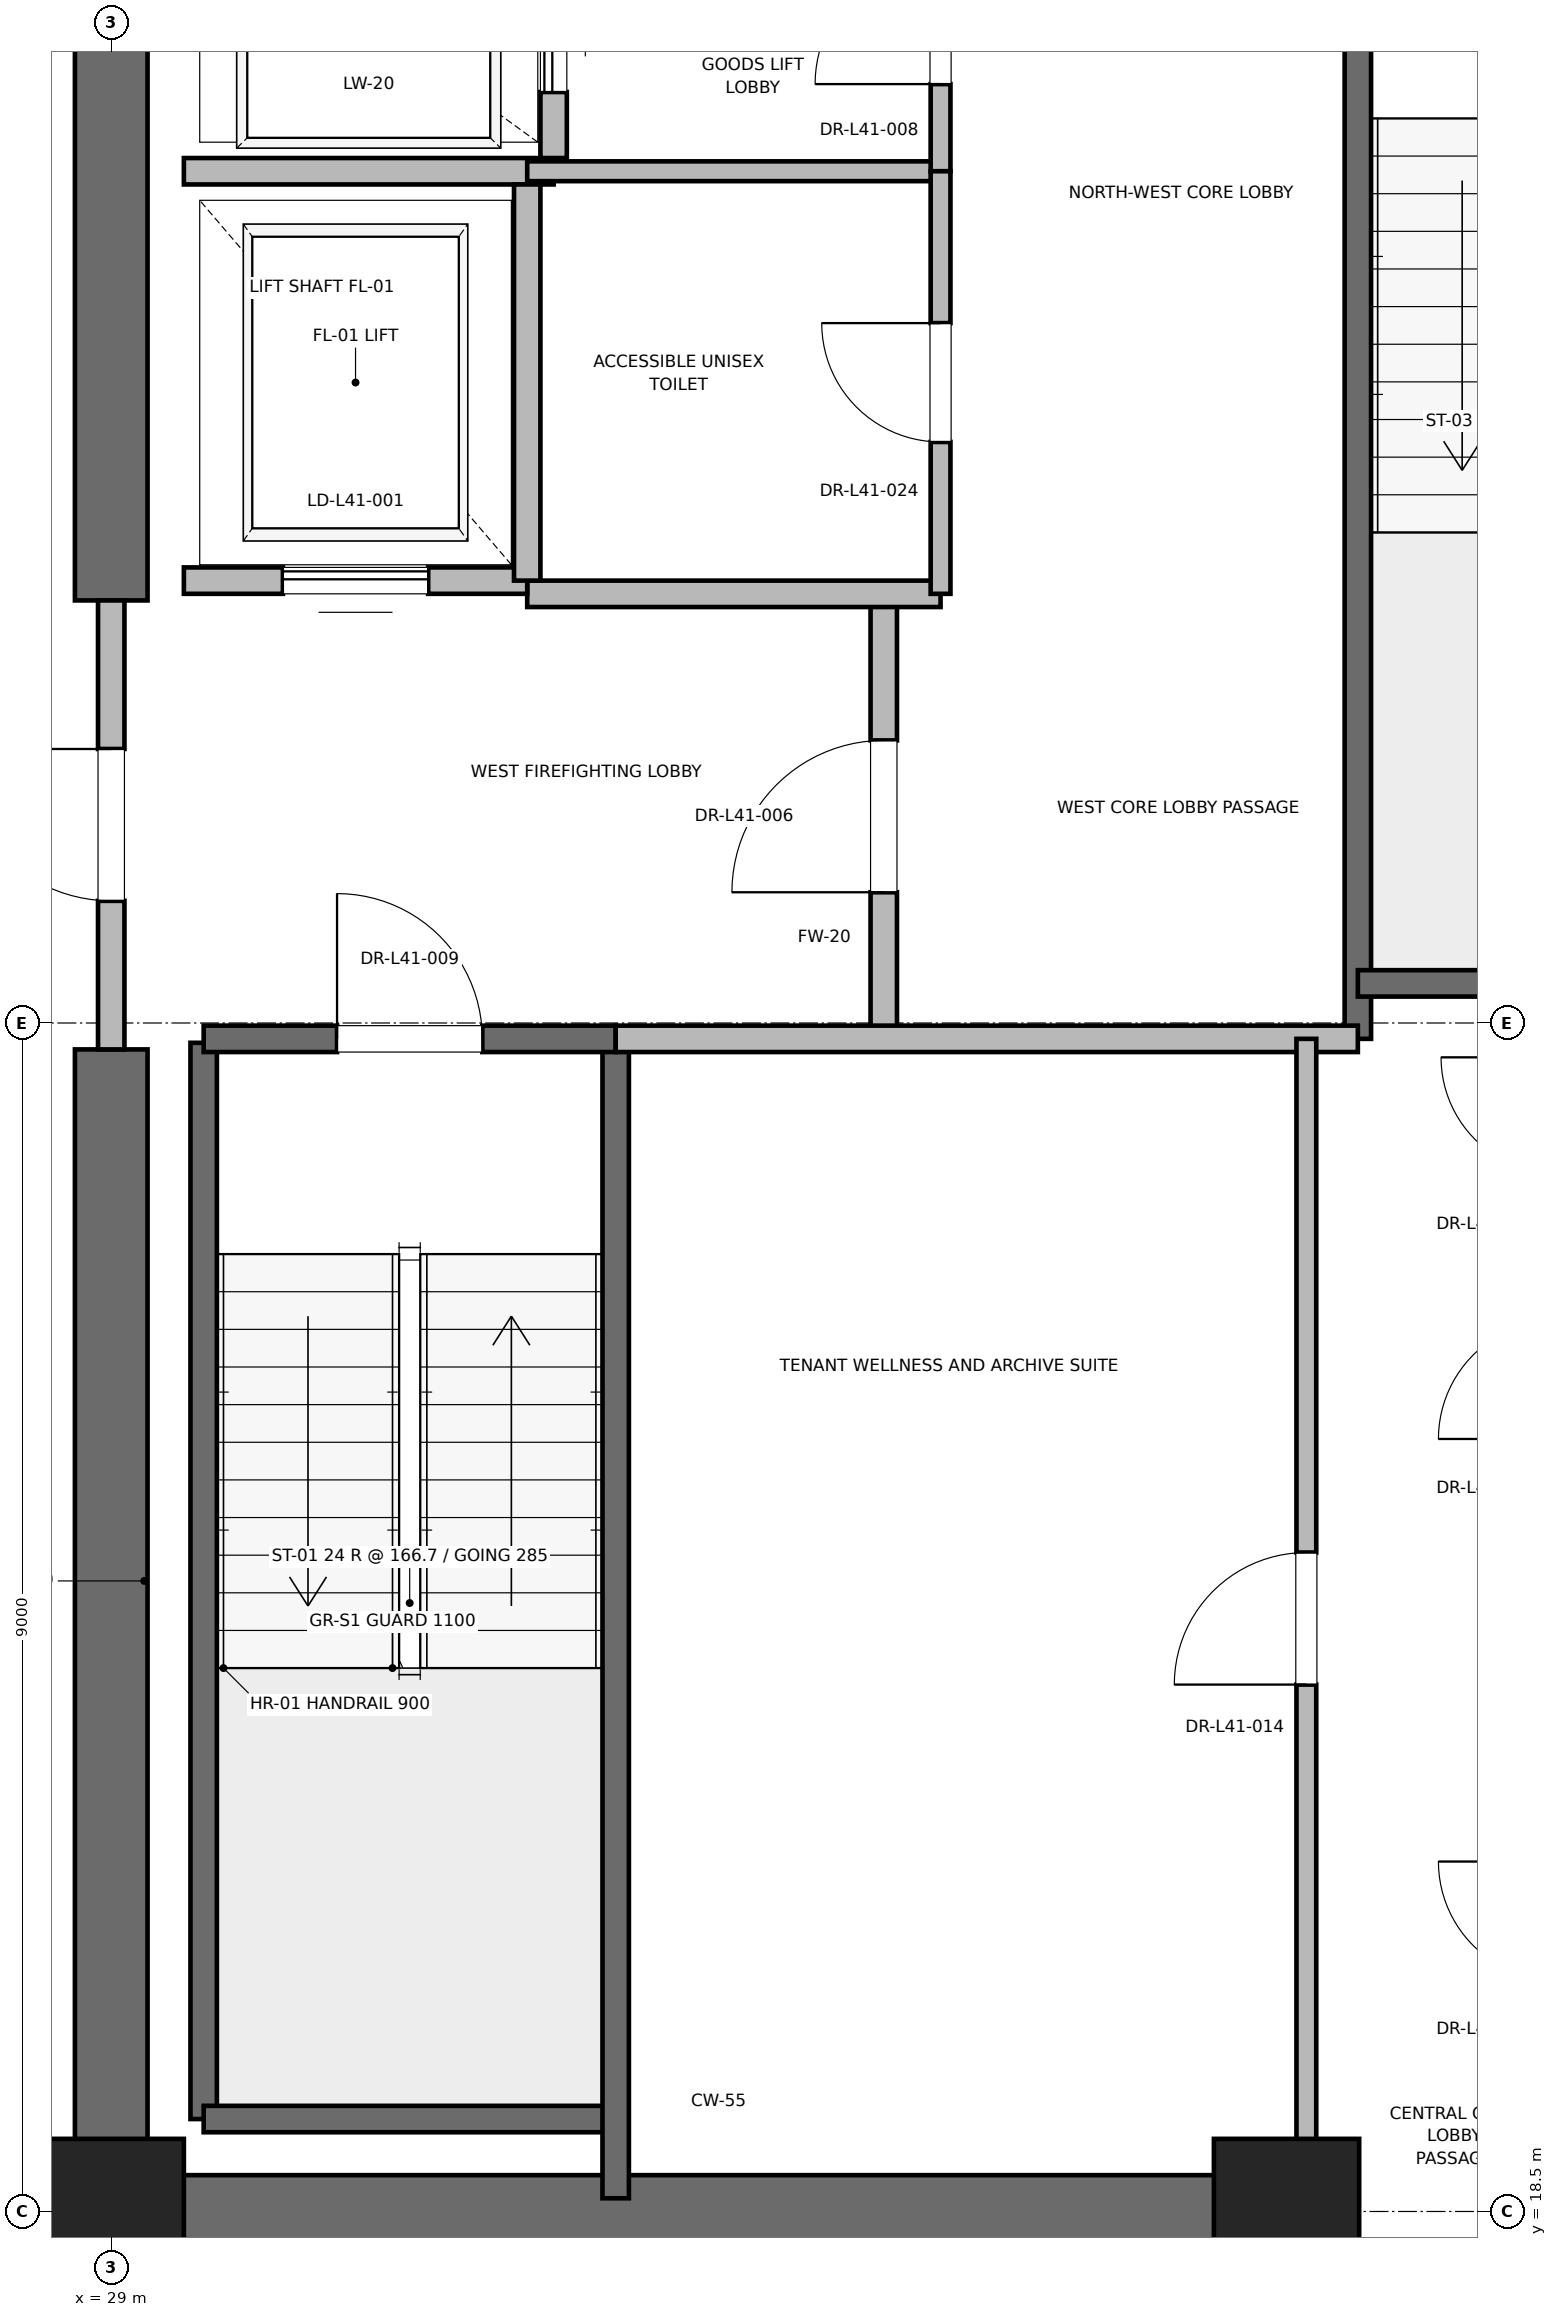
"""IFC4 building model, lengths in metres.
Left out: names, types, materials, properties, quantities, classifications, styles, units other than length and angle.
Written with IfcOpenShell. Run it as: python <this file> out.ifc"""

import sys

from ifc_helpers import new_model, si_unit, direction, frame, frame_2d, origin, origin_2d, place, context, subcontext, project, spatial, rectangle, extrude, element, fill, save


model = new_model("IFC4")
c1 = context("Model", 3, precision=1e-05, world=origin(), true_north=direction((0.0, 1.0)))
c2 = subcontext(c1, "Body", "Model", "MODEL_VIEW")
j1 = project(units=[si_unit("LENGTHUNIT", "METRE"), si_unit("PLANEANGLEUNIT", "RADIAN")], contexts=[c1])
p1 = place(None, origin())
s1 = spatial("IfcSite", under=j1, at=p1, CompositionType="ELEMENT")
p2 = place(p1, origin())
s2 = spatial("IfcBuilding", under=s1, at=p2, CompositionType="ELEMENT")
p3 = place(p2, frame((0.0, 0.0, 176.4)))
s3 = spatial("IfcBuildingStorey", under=s2, at=p3, CompositionType="ELEMENT", Elevation=176.4)
for number, where, z_axis, x_axis in (
    (1, (29.0, 18.5, 0.0), (0.0, 0.0, 1.0), (1.0, 0.0, 0.0)),
    (2, (37.9, 18.5, 0.0), (0.0, 0.0, 1.0), (1.0, 0.0, 0.0)),
):
    element("IfcColumn", number, at=place(p3, frame(where, z_axis=z_axis, x_axis=x_axis)), inside=s3, PredefinedType="PILASTER", context=c2, shape_type="SweptSolid", body=[
        extrude(rectangle(XDim=1.1, YDim=1.1, at=origin_2d()), origin(), (0.0, 0.0, 1.0), 4.0),
    ])
p4 = place(p3, frame((29.0, 18.5, 0.0), z_axis=(0.0, 0.0, 1.0), x_axis=(1.0, 0.0, 0.0)))
e3 = element("IfcWall", 3, at=p4, inside=s3, PredefinedType="SHEAR", context=c2, shape_type="SweptSolid", body=[
    extrude(rectangle(XDim=9.2, YDim=0.55, at=frame_2d((4.6, 0.0))), origin(), (0.0, 0.0, 1.0), 3.775),
])
p5 = place(p3, frame((29.0, 18.5, 0.0), z_axis=(0.0, 0.0, 1.0), x_axis=(0.0, 1.0, 0.0)))
e4 = element("IfcWall", 4, at=p5, inside=s3, PredefinedType="SHEAR", context=c2, shape_type="SweptSolid", body=[
    extrude(rectangle(XDim=8.8, YDim=0.55, at=frame_2d((4.4, 0.0))), origin(), (0.0, 0.0, 1.0), 3.775),
])
p6 = place(p3, frame((29.0, 30.7, 0.0), z_axis=(0.0, 0.0, 1.0), x_axis=(0.0, 1.0, 0.0)))
e5 = element("IfcWall", 5, at=p6, inside=s3, PredefinedType="SHEAR", context=c2, shape_type="SweptSolid", body=[
    extrude(rectangle(XDim=5.8, YDim=0.55, at=frame_2d((2.9, 0.0))), origin(), (0.0, 0.0, 1.0), 3.775),
])
p7 = place(p3, frame((29.7, 19.2, 0.0), z_axis=(0.0, 0.0, 1.0), x_axis=(0.0, 1.0, 0.0)))
e6 = element("IfcWall", 6, at=p7, inside=s3, PredefinedType="SOLIDWALL", context=c2, shape_type="SweptSolid", body=[
    extrude(rectangle(XDim=8.15, YDim=0.2, at=frame_2d((4.075, 0.0))), origin(), (0.0, 0.0, 1.0), 3.775),
])
p8 = place(p3, frame((29.7, 19.2, 0.0), z_axis=(0.0, 0.0, 1.0), x_axis=(1.0, 0.0, 0.0)))
e7 = element("IfcWall", 7, at=p8, inside=s3, PredefinedType="SOLIDWALL", context=c2, shape_type="SweptSolid", body=[
    extrude(rectangle(XDim=3.12, YDim=0.2, at=frame_2d((1.56, 0.0))), origin(), (0.0, 0.0, 1.0), 3.775),
])
p9 = place(p3, frame((32.82, 18.6, 0.0), z_axis=(0.0, 0.0, 1.0), x_axis=(0.0, 1.0, 0.0)))
e8 = element("IfcWall", 8, at=p9, inside=s3, PredefinedType="SOLIDWALL", context=c2, shape_type="SweptSolid", body=[
    extrude(rectangle(XDim=8.78, YDim=0.2, at=frame_2d((4.39, 0.0))), origin(), (0.0, 0.0, 1.0), 3.775),
])
p10 = place(p3, frame((29.7, 27.38, 0.0), z_axis=(0.0, 0.0, 1.0), x_axis=(1.0, 0.0, 0.0)))
e9 = element("IfcWall", 9, at=p10, inside=s3, PredefinedType="SOLIDWALL", context=c2, shape_type="SweptSolid", body=[
    extrude(rectangle(XDim=3.12, YDim=0.2, at=frame_2d((1.56, 0.0))), origin(), (0.0, 0.0, 1.0), 3.775),
])
p11 = place(p10, frame((1.01, 0.0, 0.0)))
e10 = element("IfcOpeningElement", 10, at=p11, cuts=e9, PredefinedType="OPENING", context=c2, shape_type="SweptSolid", body=[
    extrude(rectangle(XDim=1.1, YDim=2.15, at=frame_2d((0.55, 1.075))), frame((0.0, 0.1, 0.0), z_axis=(0.0, -1.0, 0.0), x_axis=(1.0, 0.0, 0.0)), (0.0, 0.0, 1.0), 0.2),
])
p12 = place(p3, frame((38.44, 27.38, 0.0), z_axis=(0.0, 0.0, 1.0), x_axis=(0.0, 1.0, 0.0)))
e11 = element("IfcWall", 11, at=p12, inside=s3, PredefinedType="SOLIDWALL", context=c2, shape_type="SweptSolid", body=[
    extrude(rectangle(XDim=8.87, YDim=0.2, at=frame_2d((4.435, 0.0))), origin(), (0.0, 0.0, 1.0), 3.775),
])
p13 = place(p3, frame((38.44, 27.8, 0.0), z_axis=(0.0, 0.0, 1.0), x_axis=(1.0, 0.0, 0.0)))
e12 = element("IfcWall", 12, at=p13, inside=s3, PredefinedType="SOLIDWALL", context=c2, shape_type="SweptSolid", body=[
    extrude(rectangle(XDim=3.32, YDim=0.2, at=frame_2d((1.66, 0.0))), origin(), (0.0, 0.0, 1.0), 3.775),
])
p14 = place(p3, frame((34.85, 27.38, 0.0), z_axis=(0.0, 0.0, 1.0), x_axis=(0.0, 1.0, 0.0)))
e13 = element("IfcWall", 13, at=p14, inside=s3, PredefinedType="PARTITIONING", context=c2, shape_type="SweptSolid", body=[
    extrude(rectangle(XDim=3.37, YDim=0.2, at=frame_2d((1.685, 0.0))), origin(), (0.0, 0.0, 1.0), 3.775),
])
p15 = place(p14, frame((1.11, 0.0, 0.0)))
e14 = element("IfcOpeningElement", 14, at=p15, cuts=e13, PredefinedType="OPENING", context=c2, shape_type="SweptSolid", body=[
    extrude(rectangle(XDim=1.15, YDim=2.2, at=frame_2d((0.575, 1.1))), frame((0.0, 0.1, 0.0), z_axis=(0.0, -1.0, 0.0), x_axis=(1.0, 0.0, 0.0)), (0.0, 0.0, 1.0), 0.2),
])
p16 = place(p3, frame((29.0, 27.3, 0.0), z_axis=(0.0, 0.0, 1.0), x_axis=(0.0, 1.0, 0.0)))
e15 = element("IfcWall", 15, at=p16, inside=s3, PredefinedType="PARTITIONING", context=c2, shape_type="SweptSolid", body=[
    extrude(rectangle(XDim=3.4, YDim=0.2, at=frame_2d((1.7, 0.0))), origin(), (0.0, 0.0, 1.0), 2.755),
])
p17 = place(p16, frame((1.125, 0.0, 0.0)))
e16 = element("IfcOpeningElement", 16, at=p17, cuts=e15, PredefinedType="OPENING", context=c2, shape_type="SweptSolid", body=[
    extrude(rectangle(XDim=1.15, YDim=2.2, at=frame_2d((0.575, 1.1))), frame((0.0, 0.1, 0.0), z_axis=(0.0, -1.0, 0.0), x_axis=(1.0, 0.0, 0.0)), (0.0, 0.0, 1.0), 0.2),
])
p18 = place(p3, frame((32.82, 27.38, 0.0), z_axis=(0.0, 0.0, 1.0), x_axis=(1.0, 0.0, 0.0)))
e17 = element("IfcWall", 17, at=p18, inside=s3, PredefinedType="PARTITIONING", context=c2, shape_type="SweptSolid", body=[
    extrude(rectangle(XDim=5.62, YDim=0.2, at=frame_2d((2.81, 0.0))), origin(), (0.0, 0.0, 1.0), 3.775),
])
p19 = place(p3, frame((32.15, 30.75, 0.0), z_axis=(0.0, 0.0, 1.0), x_axis=(1.0, 0.0, 0.0)))
e18 = element("IfcWall", 18, at=p19, inside=s3, PredefinedType="PARTITIONING", context=c2, shape_type="SweptSolid", body=[
    extrude(rectangle(XDim=3.13, YDim=0.2, at=frame_2d((1.565, 0.0))), origin(), (0.0, 0.0, 1.0), 3.775),
])
p20 = place(p3, frame((29.55, 30.85, 0.0), z_axis=(0.0, 0.0, 1.0), x_axis=(1.0, 0.0, 0.0)))
e19 = element("IfcWall", 19, at=p20, inside=s3, PredefinedType="SOLIDWALL", context=c2, shape_type="SweptSolid", body=[
    extrude(rectangle(XDim=2.6, YDim=0.2, at=frame_2d((1.3, 0.0))), origin(), (0.0, 0.0, 1.0), 2.755),
])
p21 = place(p20, frame((0.75, 0.0, 0.0)))
e20 = element("IfcOpeningElement", 20, at=p21, cuts=e19, PredefinedType="OPENING", context=c2, shape_type="SweptSolid", body=[
    extrude(rectangle(XDim=1.1, YDim=2.2, at=frame_2d((0.55, 1.1))), frame((0.0, 0.1, 0.0), z_axis=(0.0, -1.0, 0.0), x_axis=(1.0, 0.0, 0.0)), (0.0, 0.0, 1.0), 0.2),
])
p22 = place(p3, frame((29.55, 33.95, 0.0), z_axis=(0.0, 0.0, 1.0), x_axis=(1.0, 0.0, 0.0)))
e21 = element("IfcWall", 21, at=p22, inside=s3, PredefinedType="SOLIDWALL", context=c2, shape_type="SweptSolid", body=[
    extrude(rectangle(XDim=2.8, YDim=0.2, at=frame_2d((1.4, 0.0))), origin(), (0.0, 0.0, 1.0), 3.775),
])
p23 = place(p3, frame((32.15, 30.85, 0.0), z_axis=(0.0, 0.0, 1.0), x_axis=(0.0, 1.0, 0.0)))
e22 = element("IfcWall", 22, at=p23, inside=s3, PredefinedType="SOLIDWALL", context=c2, shape_type="SweptSolid", body=[
    extrude(rectangle(XDim=3.0, YDim=0.2, at=frame_2d((1.5, 0.0))), origin(), (0.0, 0.0, 1.0), 3.775),
])
p24 = place(p3, frame((32.35, 34.05, 0.0), z_axis=(0.0, 0.0, 1.0), x_axis=(0.0, 1.0, 0.0)))
e23 = element("IfcWall", 23, at=p24, inside=s3, PredefinedType="SOLIDWALL", context=c2, shape_type="SweptSolid", body=[
    extrude(rectangle(XDim=2.1, YDim=0.2, at=frame_2d((1.05, 0.0))), origin(), (0.0, 0.0, 1.0), 3.775),
])
p25 = place(p24, frame((0.5, 0.0, 0.0)))
e24 = element("IfcOpeningElement", 24, at=p25, cuts=e23, PredefinedType="OPENING", context=c2, shape_type="SweptSolid", body=[
    extrude(rectangle(XDim=1.1, YDim=2.2, at=frame_2d((0.55, 1.1))), frame((0.0, 0.1, 0.0), z_axis=(0.0, -1.0, 0.0), x_axis=(1.0, 0.0, 0.0)), (0.0, 0.0, 1.0), 0.2),
])
p26 = place(p3, frame((32.15, 33.95, 0.0), z_axis=(0.0, 0.0, 1.0), x_axis=(1.0, 0.0, 0.0)))
e25 = element("IfcWall", 25, at=p26, inside=s3, PredefinedType="PARTITIONING", context=c2, shape_type="SweptSolid", body=[
    extrude(rectangle(XDim=3.13, YDim=0.15, at=frame_2d((1.565, 0.0))), origin(), (0.0, 0.0, 1.0), 2.85),
])
p27 = place(p3, frame((35.28, 33.95, 0.0), z_axis=(0.0, 0.0, 1.0), x_axis=(0.0, 1.0, 0.0)))
e26 = element("IfcWall", 26, at=p27, inside=s3, PredefinedType="PARTITIONING", context=c2, shape_type="SweptSolid", body=[
    extrude(rectangle(XDim=2.27, YDim=0.15, at=frame_2d((1.135, 0.0))), origin(), (0.0, 0.0, 1.0), 2.755),
])
p28 = place(p27, frame((0.66, 0.0, 0.0)))
e27 = element("IfcOpeningElement", 27, at=p28, cuts=e26, PredefinedType="OPENING", context=c2, shape_type="SweptSolid", body=[
    extrude(rectangle(XDim=0.95, YDim=2.15, at=frame_2d((0.475, 1.075))), frame((0.0, 0.075, 0.0), z_axis=(0.0, -1.0, 0.0), x_axis=(1.0, 0.0, 0.0)), (0.0, 0.0, 1.0), 0.15),
])
p29 = place(p3, frame((35.28, 30.75, 0.0), z_axis=(0.0, 0.0, 1.0), x_axis=(0.0, 1.0, 0.0)))
e28 = element("IfcWall", 28, at=p29, inside=s3, PredefinedType="PARTITIONING", context=c2, shape_type="SweptSolid", body=[
    extrude(rectangle(XDim=3.2, YDim=0.15, at=frame_2d((1.6, 0.0))), origin(), (0.0, 0.0, 1.0), 2.85),
])
p30 = place(p29, frame((1.15, 0.0, 0.0)))
e29 = element("IfcOpeningElement", 29, at=p30, cuts=e28, PredefinedType="OPENING", context=c2, shape_type="SweptSolid", body=[
    extrude(rectangle(XDim=0.9, YDim=2.1, at=frame_2d((0.45, 1.05))), frame((0.0, 0.075, 0.0), z_axis=(0.0, -1.0, 0.0), x_axis=(1.0, 0.0, 0.0)), (0.0, 0.0, 1.0), 0.15),
])
p31 = place(p3, frame((38.05, 18.6, 0.0), z_axis=(0.0, 0.0, 1.0), x_axis=(0.0, 1.0, 0.0)))
e30 = element("IfcWall", 30, at=p31, inside=s3, PredefinedType="PARTITIONING", context=c2, shape_type="SweptSolid", body=[
    extrude(rectangle(XDim=8.78, YDim=0.15, at=frame_2d((4.39, 0.0))), origin(), (0.0, 0.0, 1.0), 2.755),
])
p32 = place(p31, frame((3.89, 0.0, 0.0)))
e31 = element("IfcOpeningElement", 31, at=p32, cuts=e30, PredefinedType="OPENING", context=c2, shape_type="SweptSolid", body=[
    extrude(rectangle(XDim=1.0, YDim=2.15, at=frame_2d((0.5, 1.075))), frame((0.0, 0.075, 0.0), z_axis=(0.0, -1.0, 0.0), x_axis=(1.0, 0.0, 0.0)), (0.0, 0.0, 1.0), 0.15),
])
p33 = place(p11, origin())
e32 = element("IfcDoor", 32, at=p33, inside=s3, OperationType="SINGLE_SWING_LEFT", PredefinedType="DOOR", context=c2, shape_type="SweptSolid", body=[
    extrude(rectangle(XDim=1.1, YDim=2.15, at=frame_2d((0.55, 1.075))), frame((0.0, 0.025, 0.0), z_axis=(0.0, -1.0, 0.0), x_axis=(1.0, 0.0, 0.0)), (0.0, 0.0, 1.0), 0.05),
])
fill(e10, e32)
p34 = place(p15, origin())
e33 = element("IfcDoor", 33, at=p34, inside=s3, OperationType="SINGLE_SWING_LEFT", PredefinedType="DOOR", context=c2, shape_type="SweptSolid", body=[
    extrude(rectangle(XDim=1.15, YDim=2.2, at=frame_2d((0.575, 1.1))), frame((0.0, 0.025, 0.0), z_axis=(0.0, -1.0, 0.0), x_axis=(1.0, 0.0, 0.0)), (0.0, 0.0, 1.0), 0.05),
])
fill(e14, e33)
p35 = place(p17, origin())
e34 = element("IfcDoor", 34, at=p35, inside=s3, OperationType="SINGLE_SWING_RIGHT", PredefinedType="DOOR", context=c2, shape_type="SweptSolid", body=[
    extrude(rectangle(XDim=1.15, YDim=2.2, at=frame_2d((0.575, 1.1))), frame((0.0, 0.025, 0.0), z_axis=(0.0, -1.0, 0.0), x_axis=(1.0, 0.0, 0.0)), (0.0, 0.0, 1.0), 0.05),
])
fill(e16, e34)
p36 = place(p21, origin())
e35 = element("IfcDoor", 35, at=p36, inside=s3, OperationType="SLIDING_TO_RIGHT", PredefinedType="DOOR", context=c2, shape_type="SweptSolid", body=[
    extrude(rectangle(XDim=1.1, YDim=2.2, at=frame_2d((0.55, 1.1))), frame((0.0, 0.025, 0.0), z_axis=(0.0, -1.0, 0.0), x_axis=(1.0, 0.0, 0.0)), (0.0, 0.0, 1.0), 0.05),
])
fill(e20, e35)
p37 = place(p25, origin())
e36 = element("IfcDoor", 36, at=p37, inside=s3, OperationType="SLIDING_TO_RIGHT", PredefinedType="DOOR", context=c2, shape_type="SweptSolid", body=[
    extrude(rectangle(XDim=1.1, YDim=2.2, at=frame_2d((0.55, 1.1))), frame((0.0, 0.025, 0.0), z_axis=(0.0, -1.0, 0.0), x_axis=(1.0, 0.0, 0.0)), (0.0, 0.0, 1.0), 0.05),
])
fill(e24, e36)
p38 = place(p28, origin())
e37 = element("IfcDoor", 37, at=p38, inside=s3, OperationType="SINGLE_SWING_LEFT", PredefinedType="DOOR", context=c2, shape_type="SweptSolid", body=[
    extrude(rectangle(XDim=0.95, YDim=2.15, at=frame_2d((0.475, 1.075))), frame((0.0, 0.025, 0.0), z_axis=(0.0, -1.0, 0.0), x_axis=(1.0, 0.0, 0.0)), (0.0, 0.0, 1.0), 0.05),
])
fill(e27, e37)
p39 = place(p30, origin())
e38 = element("IfcDoor", 38, at=p39, inside=s3, OperationType="SINGLE_SWING_RIGHT", PredefinedType="DOOR", context=c2, shape_type="SweptSolid", body=[
    extrude(rectangle(XDim=0.9, YDim=2.1, at=frame_2d((0.45, 1.05))), frame((0.0, 0.025, 0.0), z_axis=(0.0, -1.0, 0.0), x_axis=(1.0, 0.0, 0.0)), (0.0, 0.0, 1.0), 0.05),
])
fill(e29, e38)
p40 = place(p32, origin())
e39 = element("IfcDoor", 39, at=p40, inside=s3, OperationType="SINGLE_SWING_LEFT", PredefinedType="DOOR", context=c2, shape_type="SweptSolid", body=[
    extrude(rectangle(XDim=1.0, YDim=2.15, at=frame_2d((0.5, 1.075))), frame((0.0, 0.025, 0.0), z_axis=(0.0, -1.0, 0.0), x_axis=(1.0, 0.0, 0.0)), (0.0, 0.0, 1.0), 0.05),
])
fill(e31, e39)
save(model, sys.argv[1])
